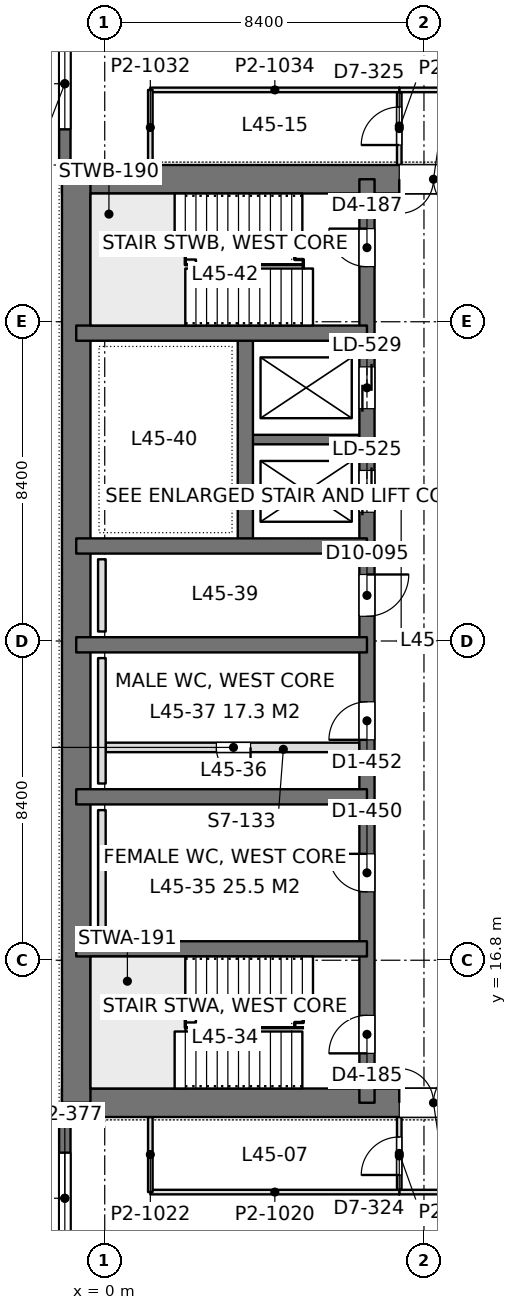
"""IFC4 building model, lengths in metres.
Left out: names, types, materials, properties, quantities, classifications, styles, units other than length and angle.
Written with IfcOpenShell. Run it as: python <this file> out.ifc"""

import sys

from ifc_helpers import new_model, si_unit, direction, frame, frame_2d, origin, place, context, subcontext, project, spatial, rectangle, extrude, element, fill, save


model = new_model("IFC4")
c1 = context("Model", 3, precision=1e-05, world=origin(), true_north=direction((0.0, 1.0)))
c2 = subcontext(c1, "Body", "Model", "MODEL_VIEW")
j1 = project(units=[si_unit("LENGTHUNIT", "METRE"), si_unit("PLANEANGLEUNIT", "RADIAN")], contexts=[c1])
p1 = place(None, origin())
s1 = spatial("IfcSite", under=j1, at=p1, CompositionType="ELEMENT")
p2 = place(p1, origin())
s2 = spatial("IfcBuilding", under=s1, at=p2, CompositionType="ELEMENT")
p3 = place(p2, frame((0.0, 0.0, 198.6)))
s3 = spatial("IfcBuildingStorey", under=s2, at=p3, CompositionType="ELEMENT", Elevation=198.6)
p4 = place(p3, frame((-1.125, 13.05, 0.0), z_axis=(0.0, 0.0, 1.0), x_axis=(1.0, 0.0, 0.0)))
e1 = element("IfcWall", 1, at=p4, inside=s3, PredefinedType="SHEAR", context=c2, shape_type="SweptSolid", body=[
    extrude(rectangle(XDim=17.85, YDim=0.75, at=frame_2d((8.925, 0.0))), origin(), (0.0, 0.0, 1.0), 4.2),
])
p5 = place(p4, frame((8.875, 0.0, 0.0)))
e2 = element("IfcOpeningElement", 2, at=p5, cuts=e1, PredefinedType="OPENING", context=c2, shape_type="SweptSolid", body=[
    extrude(rectangle(XDim=1.8, YDim=2.4, at=frame_2d((0.9, 1.2))), frame((0.0, 0.385, 0.0), z_axis=(0.0, -1.0, 0.0), x_axis=(1.0, 0.0, 0.0)), (0.0, 0.0, 1.0), 0.77),
])
p6 = place(p3, frame((-1.125, 37.35, 0.0), z_axis=(0.0, 0.0, 1.0), x_axis=(1.0, 0.0, 0.0)))
e3 = element("IfcWall", 3, at=p6, inside=s3, PredefinedType="SHEAR", context=c2, shape_type="SweptSolid", body=[
    extrude(rectangle(XDim=17.85, YDim=0.75, at=frame_2d((8.925, 0.0))), origin(), (0.0, 0.0, 1.0), 4.2),
])
p7 = place(p6, frame((8.875, 0.0, 0.0)))
e4 = element("IfcOpeningElement", 4, at=p7, cuts=e3, PredefinedType="OPENING", context=c2, shape_type="SweptSolid", body=[
    extrude(rectangle(XDim=1.8, YDim=2.4, at=frame_2d((0.9, 1.2))), frame((0.0, 0.385, 0.0), z_axis=(0.0, -1.0, 0.0), x_axis=(1.0, 0.0, 0.0)), (0.0, 0.0, 1.0), 0.77),
])
p8 = place(p3, frame((-0.75, 13.05, 0.0), z_axis=(0.0, 0.0, 1.0), x_axis=(0.0, 1.0, 0.0)))
e5 = element("IfcWall", 5, at=p8, inside=s3, PredefinedType="SHEAR", context=c2, shape_type="SweptSolid", body=[
    extrude(rectangle(XDim=24.3, YDim=0.75, at=frame_2d((12.15, 0.0))), origin(), (0.0, 0.0, 1.0), 4.2),
])
p9 = place(p3, frame((6.9, 13.05, 0.0), z_axis=(0.0, 0.0, 1.0), x_axis=(0.0, 1.0, 0.0)))
e6 = element("IfcWall", 6, at=p9, inside=s3, PredefinedType="SHEAR", context=c2, shape_type="SweptSolid", body=[
    extrude(rectangle(XDim=24.3, YDim=0.4, at=frame_2d((12.15, 0.0))), origin(), (0.0, 0.0, 1.0), 4.2),
])
p10 = place(p9, frame((1.3, 0.0, 0.0)))
e7 = element("IfcOpeningElement", 7, at=p10, cuts=e6, PredefinedType="OPENING", context=c2, shape_type="SweptSolid", body=[
    extrude(rectangle(XDim=1.0, YDim=2.2, at=frame_2d((0.5, 1.1))), frame((0.0, 0.21, 0.0), z_axis=(0.0, -1.0, 0.0), x_axis=(1.0, 0.0, 0.0)), (0.0, 0.0, 1.0), 0.42),
])
p11 = place(p9, frame((22.0, 0.0, 0.0)))
e8 = element("IfcOpeningElement", 8, at=p11, cuts=e6, PredefinedType="OPENING", context=c2, shape_type="SweptSolid", body=[
    extrude(rectangle(XDim=1.0, YDim=2.2, at=frame_2d((0.5, 1.1))), frame((0.0, 0.21, 0.0), z_axis=(0.0, -1.0, 0.0), x_axis=(1.0, 0.0, 0.0)), (0.0, 0.0, 1.0), 0.42),
])
p12 = place(p9, frame((5.55, 0.0, 0.0)))
e9 = element("IfcOpeningElement", 9, at=p12, cuts=e6, PredefinedType="OPENING", context=c2, shape_type="SweptSolid", body=[
    extrude(rectangle(XDim=1.0, YDim=2.2, at=frame_2d((0.5, 1.1))), frame((0.0, 0.21, 0.0), z_axis=(0.0, -1.0, 0.0), x_axis=(1.0, 0.0, 0.0)), (0.0, 0.0, 1.0), 0.42),
])
p13 = place(p9, frame((9.55, 0.0, 0.0)))
e10 = element("IfcOpeningElement", 10, at=p13, cuts=e6, PredefinedType="OPENING", context=c2, shape_type="SweptSolid", body=[
    extrude(rectangle(XDim=1.0, YDim=2.2, at=frame_2d((0.5, 1.1))), frame((0.0, 0.21, 0.0), z_axis=(0.0, -1.0, 0.0), x_axis=(1.0, 0.0, 0.0)), (0.0, 0.0, 1.0), 0.42),
])
p14 = place(p9, frame((12.8, 0.0, 0.0)))
e11 = element("IfcOpeningElement", 11, at=p14, cuts=e6, PredefinedType="OPENING", context=c2, shape_type="SweptSolid", body=[
    extrude(rectangle(XDim=1.1, YDim=2.2, at=frame_2d((0.55, 1.1))), frame((0.0, 0.21, 0.0), z_axis=(0.0, -1.0, 0.0), x_axis=(1.0, 0.0, 0.0)), (0.0, 0.0, 1.0), 0.42),
])
p15 = place(p9, frame((15.538, 0.0, 0.0)))
e12 = element("IfcOpeningElement", 12, at=p15, cuts=e6, PredefinedType="OPENING", context=c2, shape_type="SweptSolid", body=[
    extrude(rectangle(XDim=1.1, YDim=2.2, at=frame_2d((0.55, 1.1))), frame((0.0, 0.21, 0.0), z_axis=(0.0, -1.0, 0.0), x_axis=(1.0, 0.0, 0.0)), (0.0, 0.0, 1.0), 0.42),
])
p16 = place(p9, frame((18.262, 0.0, 0.0)))
e13 = element("IfcOpeningElement", 13, at=p16, cuts=e6, PredefinedType="OPENING", context=c2, shape_type="SweptSolid", body=[
    extrude(rectangle(XDim=1.1, YDim=2.2, at=frame_2d((0.55, 1.1))), frame((0.0, 0.21, 0.0), z_axis=(0.0, -1.0, 0.0), x_axis=(1.0, 0.0, 0.0)), (0.0, 0.0, 1.0), 0.42),
])
for number, where, z_axis, x_axis in (
    (14, (-0.75, 17.1, 0.0), (0.0, 0.0, 1.0), (1.0, 0.0, 0.0)),
    (15, (-0.75, 21.1, 0.0), (0.0, 0.0, 1.0), (1.0, 0.0, 0.0)),
    (16, (-0.75, 25.1, 0.0), (0.0, 0.0, 1.0), (1.0, 0.0, 0.0)),
    (17, (-0.75, 27.7, 0.0), (0.0, 0.0, 1.0), (1.0, 0.0, 0.0)),
    (18, (-0.75, 33.3, 0.0), (0.0, 0.0, 1.0), (1.0, 0.0, 0.0)),
):
    element("IfcWall", number, at=place(p3, frame(where, z_axis=z_axis, x_axis=x_axis)), inside=s3, PredefinedType="SHEAR", context=c2, shape_type="SweptSolid", body=[
        extrude(rectangle(XDim=7.65, YDim=0.4, at=frame_2d((3.825, 0.0))), origin(), (0.0, 0.0, 1.0), 4.2),
    ])
p17 = place(p3, frame((3.7, 27.7, 0.0), z_axis=(0.0, 0.0, 1.0), x_axis=(0.0, 1.0, 0.0)))
e19 = element("IfcWall", 19, at=p17, inside=s3, PredefinedType="SHEAR", context=c2, shape_type="SweptSolid", body=[
    extrude(rectangle(XDim=5.6, YDim=0.4, at=frame_2d((2.8, 0.0))), origin(), (0.0, 0.0, 1.0), 4.2),
])
p18 = place(p3, frame((3.7, 30.5, 0.0), z_axis=(0.0, 0.0, 1.0), x_axis=(1.0, 0.0, 0.0)))
e20 = element("IfcWall", 20, at=p18, inside=s3, PredefinedType="SHEAR", context=c2, shape_type="SweptSolid", body=[
    extrude(rectangle(XDim=3.2, YDim=0.25, at=frame_2d((1.6, 0.0))), origin(), (0.0, 0.0, 1.0), 4.2),
])
p19 = place(p3, frame((-1.05, 8.4, 0.0), z_axis=(0.0, 0.0, 1.0), x_axis=(0.0, 1.0, 0.0)))
e21 = element("IfcWall", 21, at=p19, inside=s3, PredefinedType="SOLIDWALL", context=c2, shape_type="SweptSolid", body=[
    extrude(rectangle(XDim=4.275, YDim=0.3, at=frame_2d((2.138, 0.0))), origin(), (0.0, 0.0, 1.0), 4.05),
])
p20 = place(p19, frame((0.938, 0.0, 0.9)))
e22 = element("IfcOpeningElement", 22, at=p20, cuts=e21, PredefinedType="OPENING", context=c2, shape_type="SweptSolid", body=[
    extrude(rectangle(XDim=2.4, YDim=1.9, at=frame_2d((1.2, 0.95))), frame((0.0, 0.16, 0.0), z_axis=(0.0, -1.0, 0.0), x_axis=(1.0, 0.0, 0.0)), (0.0, 0.0, 1.0), 0.32),
])
p21 = place(p3, frame((-1.05, 37.725, 0.0), z_axis=(0.0, 0.0, 1.0), x_axis=(0.0, 1.0, 0.0)))
e23 = element("IfcWall", 23, at=p21, inside=s3, PredefinedType="SOLIDWALL", context=c2, shape_type="SweptSolid", body=[
    extrude(rectangle(XDim=4.275, YDim=0.3, at=frame_2d((2.137, 0.0))), origin(), (0.0, 0.0, 1.0), 4.05),
])
p22 = place(p21, frame((0.938, 0.0, 0.9)))
e24 = element("IfcOpeningElement", 24, at=p22, cuts=e23, PredefinedType="OPENING", context=c2, shape_type="SweptSolid", body=[
    extrude(rectangle(XDim=2.4, YDim=1.9, at=frame_2d((1.2, 0.95))), frame((0.0, 0.16, 0.0), z_axis=(0.0, -1.0, 0.0), x_axis=(1.0, 0.0, 0.0)), (0.0, 0.0, 1.0), 0.32),
])
p23 = place(p3, frame((7.748, 10.7, 0.0), z_axis=(0.0, 0.0, 1.0), x_axis=(1.0, 0.0, 0.0)))
e25 = element("IfcWall", 25, at=p23, inside=s3, PredefinedType="PARTITIONING", context=c2, shape_type="SweptSolid", body=[
    extrude(rectangle(XDim=41.452, YDim=0.12, at=frame_2d((20.726, 0.0))), origin(), (0.0, 0.0, 1.0), 3.55),
])
p24 = place(p23, frame((4.919, 0.0, 0.0)))
e26 = element("IfcOpeningElement", 26, at=p24, cuts=e25, PredefinedType="OPENING", context=c2, shape_type="SweptSolid", body=[
    extrude(rectangle(XDim=1.8, YDim=2.2, at=frame_2d((0.9, 1.1))), frame((0.0, 0.07, 0.0), z_axis=(0.0, -1.0, 0.0), x_axis=(1.0, 0.0, 0.0)), (0.0, 0.0, 1.0), 0.14),
])
p25 = place(p23, frame((10.735, 0.0, 0.0)))
e27 = element("IfcOpeningElement", 27, at=p25, cuts=e25, PredefinedType="OPENING", context=c2, shape_type="SweptSolid", body=[
    extrude(rectangle(XDim=1.8, YDim=2.2, at=frame_2d((0.9, 1.1))), frame((0.0, 0.07, 0.0), z_axis=(0.0, -1.0, 0.0), x_axis=(1.0, 0.0, 0.0)), (0.0, 0.0, 1.0), 0.14),
])
p26 = place(p23, frame((24.552, 0.0, 0.0)))
e28 = element("IfcOpeningElement", 28, at=p26, cuts=e25, PredefinedType="OPENING", context=c2, shape_type="SweptSolid", body=[
    extrude(rectangle(XDim=1.8, YDim=2.2, at=frame_2d((0.9, 1.1))), frame((0.0, 0.07, 0.0), z_axis=(0.0, -1.0, 0.0), x_axis=(1.0, 0.0, 0.0)), (0.0, 0.0, 1.0), 0.14),
])
p27 = place(p23, frame((32.552, 0.0, 0.0)))
e29 = element("IfcOpeningElement", 29, at=p27, cuts=e25, PredefinedType="OPENING", context=c2, shape_type="SweptSolid", body=[
    extrude(rectangle(XDim=1.8, YDim=2.2, at=frame_2d((0.9, 1.1))), frame((0.0, 0.07, 0.0), z_axis=(0.0, -1.0, 0.0), x_axis=(1.0, 0.0, 0.0)), (0.0, 0.0, 1.0), 0.14),
])
p28 = place(p3, frame((7.75, 10.758, 0.0), z_axis=(0.0, 0.0, 1.0), x_axis=(0.0, 1.0, 0.0)))
e30 = element("IfcWall", 30, at=p28, inside=s3, PredefinedType="PARTITIONING", context=c2, shape_type="SweptSolid", body=[
    extrude(rectangle(XDim=1.918, YDim=0.12, at=frame_2d((0.959, 0.0))), origin(), (0.0, 0.0, 1.0), 4.05),
])
p29 = place(p28, frame((0.392, 0.0, 0.0)))
e31 = element("IfcOpeningElement", 31, at=p29, cuts=e30, PredefinedType="OPENING", context=c2, shape_type="SweptSolid", body=[
    extrude(rectangle(XDim=1.0, YDim=2.4, at=frame_2d((0.5, 1.2))), frame((0.0, 0.07, 0.0), z_axis=(0.0, -1.0, 0.0), x_axis=(1.0, 0.0, 0.0)), (0.0, 0.0, 1.0), 0.14),
])
p30 = place(p3, frame((1.2, 10.7, 0.0), z_axis=(0.0, 0.0, 1.0), x_axis=(1.0, 0.0, 0.0)))
e32 = element("IfcWall", 32, at=p30, inside=s3, PredefinedType="PARTITIONING", context=c2, shape_type="SweptSolid", body=[
    extrude(rectangle(XDim=6.552, YDim=0.12, at=frame_2d((3.276, 0.0))), origin(), (0.0, 0.0, 1.0), 4.05),
])
p31 = place(p3, frame((1.2, 10.7, 0.0), z_axis=(0.0, 0.0, 1.0), x_axis=(0.0, 1.0, 0.0)))
e33 = element("IfcWall", 33, at=p31, inside=s3, PredefinedType="PARTITIONING", context=c2, shape_type="SweptSolid", body=[
    extrude(rectangle(XDim=1.976, YDim=0.12, at=frame_2d((0.988, 0.0))), origin(), (0.0, 0.0, 1.0), 4.05),
])
p32 = place(p3, frame((7.748, 39.7, 0.0), z_axis=(0.0, 0.0, 1.0), x_axis=(1.0, 0.0, 0.0)))
e34 = element("IfcWall", 34, at=p32, inside=s3, PredefinedType="PARTITIONING", context=c2, shape_type="SweptSolid", body=[
    extrude(rectangle(XDim=41.452, YDim=0.12, at=frame_2d((20.726, 0.0))), origin(), (0.0, 0.0, 1.0), 3.55),
])
p33 = place(p32, frame((4.919, 0.0, 0.0)))
e35 = element("IfcOpeningElement", 35, at=p33, cuts=e34, PredefinedType="OPENING", context=c2, shape_type="SweptSolid", body=[
    extrude(rectangle(XDim=1.8, YDim=2.2, at=frame_2d((0.9, 1.1))), frame((0.0, 0.07, 0.0), z_axis=(0.0, -1.0, 0.0), x_axis=(1.0, 0.0, 0.0)), (0.0, 0.0, 1.0), 0.14),
])
p34 = place(p32, frame((10.735, 0.0, 0.0)))
e36 = element("IfcOpeningElement", 36, at=p34, cuts=e34, PredefinedType="OPENING", context=c2, shape_type="SweptSolid", body=[
    extrude(rectangle(XDim=1.8, YDim=2.2, at=frame_2d((0.9, 1.1))), frame((0.0, 0.07, 0.0), z_axis=(0.0, -1.0, 0.0), x_axis=(1.0, 0.0, 0.0)), (0.0, 0.0, 1.0), 0.14),
])
p35 = place(p32, frame((24.552, 0.0, 0.0)))
e37 = element("IfcOpeningElement", 37, at=p35, cuts=e34, PredefinedType="OPENING", context=c2, shape_type="SweptSolid", body=[
    extrude(rectangle(XDim=1.8, YDim=2.2, at=frame_2d((0.9, 1.1))), frame((0.0, 0.07, 0.0), z_axis=(0.0, -1.0, 0.0), x_axis=(1.0, 0.0, 0.0)), (0.0, 0.0, 1.0), 0.14),
])
p36 = place(p32, frame((32.552, 0.0, 0.0)))
e38 = element("IfcOpeningElement", 38, at=p36, cuts=e34, PredefinedType="OPENING", context=c2, shape_type="SweptSolid", body=[
    extrude(rectangle(XDim=1.8, YDim=2.2, at=frame_2d((0.9, 1.1))), frame((0.0, 0.07, 0.0), z_axis=(0.0, -1.0, 0.0), x_axis=(1.0, 0.0, 0.0)), (0.0, 0.0, 1.0), 0.14),
])
p37 = place(p3, frame((7.75, 37.724, 0.0), z_axis=(0.0, 0.0, 1.0), x_axis=(0.0, 1.0, 0.0)))
e39 = element("IfcWall", 39, at=p37, inside=s3, PredefinedType="PARTITIONING", context=c2, shape_type="SweptSolid", body=[
    extrude(rectangle(XDim=1.918, YDim=0.12, at=frame_2d((0.959, 0.0))), origin(), (0.0, 0.0, 1.0), 4.05),
])
p38 = place(p37, frame((0.526, 0.0, 0.0)))
e40 = element("IfcOpeningElement", 40, at=p38, cuts=e39, PredefinedType="OPENING", context=c2, shape_type="SweptSolid", body=[
    extrude(rectangle(XDim=1.0, YDim=2.4, at=frame_2d((0.5, 1.2))), frame((0.0, 0.07, 0.0), z_axis=(0.0, -1.0, 0.0), x_axis=(1.0, 0.0, 0.0)), (0.0, 0.0, 1.0), 0.14),
])
p39 = place(p3, frame((1.2, 39.7, 0.0), z_axis=(0.0, 0.0, 1.0), x_axis=(1.0, 0.0, 0.0)))
e41 = element("IfcWall", 41, at=p39, inside=s3, PredefinedType="PARTITIONING", context=c2, shape_type="SweptSolid", body=[
    extrude(rectangle(XDim=6.552, YDim=0.12, at=frame_2d((3.276, 0.0))), origin(), (0.0, 0.0, 1.0), 3.69),
])
p40 = place(p3, frame((1.2, 37.724, 0.0), z_axis=(0.0, 0.0, 1.0), x_axis=(0.0, 1.0, 0.0)))
e42 = element("IfcWall", 42, at=p40, inside=s3, PredefinedType="PARTITIONING", context=c2, shape_type="SweptSolid", body=[
    extrude(rectangle(XDim=1.976, YDim=0.12, at=frame_2d((0.988, 0.0))), origin(), (0.0, 0.0, 1.0), 4.05),
])
p41 = place(p3, frame((0.025, 22.4, 0.0), z_axis=(0.0, 0.0, 1.0), x_axis=(1.0, 0.0, 0.0)))
e43 = element("IfcWall", 43, at=p41, inside=s3, PredefinedType="PARTITIONING", context=c2, shape_type="SweptSolid", body=[
    extrude(rectangle(XDim=6.675, YDim=0.25, at=frame_2d((3.337, 0.0))), origin(), (0.0, 0.0, 1.0), 4.0),
])
p42 = place(p41, frame((2.913, 0.0, 0.0)))
e44 = element("IfcOpeningElement", 44, at=p42, cuts=e43, PredefinedType="OPENING", context=c2, shape_type="SweptSolid", body=[
    extrude(rectangle(XDim=0.9, YDim=2.2, at=frame_2d((0.45, 1.1))), frame((0.0, 0.135, 0.0), z_axis=(0.0, -1.0, 0.0), x_axis=(1.0, 0.0, 0.0)), (0.0, 0.0, 1.0), 0.27),
])
for number, where, z_axis, x_axis in (
    (45, (-0.075, 17.45, 0.0), (0.0, 0.0, 1.0), (0.0, 1.0, 0.0)),
    (46, (-0.075, 21.45, 0.0), (0.0, 0.0, 1.0), (0.0, 1.0, 0.0)),
):
    element("IfcWall", number, at=place(p3, frame(where, z_axis=z_axis, x_axis=x_axis)), inside=s3, PredefinedType="PLUMBINGWALL", context=c2, shape_type="SweptSolid", body=[
        extrude(rectangle(XDim=3.3, YDim=0.2, at=frame_2d((1.65, 0.0))), origin(), (0.0, 0.0, 1.0), 1.2),
    ])
p43 = place(p3, frame((-0.075, 25.45, 0.0), z_axis=(0.0, 0.0, 1.0), x_axis=(0.0, 1.0, 0.0)))
e47 = element("IfcWall", 47, at=p43, inside=s3, PredefinedType="PLUMBINGWALL", context=c2, shape_type="SweptSolid", body=[
    extrude(rectangle(XDim=1.9, YDim=0.2, at=frame_2d((0.95, 0.0))), origin(), (0.0, 0.0, 1.0), 1.2),
])
p44 = place(p20, origin())
e48 = element("IfcWindow", 48, at=p44, inside=s3, PartitioningType="SINGLE_PANEL", PredefinedType="WINDOW", context=c2, shape_type="SweptSolid", body=[
    extrude(rectangle(XDim=2.4, YDim=1.9, at=frame_2d((1.2, 0.95))), frame((0.0, 0.03, 0.0), z_axis=(0.0, -1.0, 0.0), x_axis=(1.0, 0.0, 0.0)), (0.0, 0.0, 1.0), 0.06),
])
fill(e22, e48)
p45 = place(p22, origin())
e49 = element("IfcWindow", 49, at=p45, inside=s3, PartitioningType="SINGLE_PANEL", PredefinedType="WINDOW", context=c2, shape_type="SweptSolid", body=[
    extrude(rectangle(XDim=2.4, YDim=1.9, at=frame_2d((1.2, 0.95))), frame((0.0, 0.03, 0.0), z_axis=(0.0, -1.0, 0.0), x_axis=(1.0, 0.0, 0.0)), (0.0, 0.0, 1.0), 0.06),
])
fill(e24, e49)
p46 = place(p5, origin())
e50 = element("IfcDoor", 50, at=p46, inside=s3, OperationType="DOUBLE_DOOR_SINGLE_SWING", PredefinedType="DOOR", context=c2, shape_type="SweptSolid", body=[
    extrude(rectangle(XDim=1.8, YDim=2.4, at=frame_2d((0.9, 1.2))), frame((0.0, 0.025, 0.0), z_axis=(0.0, -1.0, 0.0), x_axis=(1.0, 0.0, 0.0)), (0.0, 0.0, 1.0), 0.05),
])
fill(e2, e50)
p47 = place(p7, frame((1.8, 0.0, 0.0), z_axis=(0.0, 0.0, 1.0), x_axis=(-1.0, 0.0, 0.0)))
e51 = element("IfcDoor", 51, at=p47, inside=s3, OperationType="DOUBLE_DOOR_SINGLE_SWING", PredefinedType="DOOR", context=c2, shape_type="SweptSolid", body=[
    extrude(rectangle(XDim=1.8, YDim=2.4, at=frame_2d((0.9, 1.2))), frame((0.0, 0.025, 0.0), z_axis=(0.0, -1.0, 0.0), x_axis=(1.0, 0.0, 0.0)), (0.0, 0.0, 1.0), 0.05),
])
fill(e4, e51)
p48 = place(p10, origin())
e52 = element("IfcDoor", 52, at=p48, inside=s3, OperationType="SINGLE_SWING_LEFT", PredefinedType="DOOR", context=c2, shape_type="SweptSolid", body=[
    extrude(rectangle(XDim=1.0, YDim=2.2, at=frame_2d((0.5, 1.1))), frame((0.0, 0.025, 0.0), z_axis=(0.0, -1.0, 0.0), x_axis=(1.0, 0.0, 0.0)), (0.0, 0.0, 1.0), 0.05),
])
fill(e7, e52)
p49 = place(p11, origin())
e53 = element("IfcDoor", 53, at=p49, inside=s3, OperationType="SINGLE_SWING_RIGHT", PredefinedType="DOOR", context=c2, shape_type="SweptSolid", body=[
    extrude(rectangle(XDim=1.0, YDim=2.2, at=frame_2d((0.5, 1.1))), frame((0.0, 0.025, 0.0), z_axis=(0.0, -1.0, 0.0), x_axis=(1.0, 0.0, 0.0)), (0.0, 0.0, 1.0), 0.05),
])
fill(e8, e53)
p50 = place(p12, origin())
e54 = element("IfcDoor", 54, at=p50, inside=s3, OperationType="SINGLE_SWING_RIGHT", PredefinedType="DOOR", context=c2, shape_type="SweptSolid", body=[
    extrude(rectangle(XDim=1.0, YDim=2.2, at=frame_2d((0.5, 1.1))), frame((0.0, 0.025, 0.0), z_axis=(0.0, -1.0, 0.0), x_axis=(1.0, 0.0, 0.0)), (0.0, 0.0, 1.0), 0.05),
])
fill(e9, e54)
p51 = place(p13, origin())
e55 = element("IfcDoor", 55, at=p51, inside=s3, OperationType="SINGLE_SWING_LEFT", PredefinedType="DOOR", context=c2, shape_type="SweptSolid", body=[
    extrude(rectangle(XDim=1.0, YDim=2.2, at=frame_2d((0.5, 1.1))), frame((0.0, 0.025, 0.0), z_axis=(0.0, -1.0, 0.0), x_axis=(1.0, 0.0, 0.0)), (0.0, 0.0, 1.0), 0.05),
])
fill(e10, e55)
p52 = place(p14, frame((1.1, 0.0, 0.0), z_axis=(0.0, 0.0, 1.0), x_axis=(-1.0, 0.0, 0.0)))
e56 = element("IfcDoor", 56, at=p52, inside=s3, OperationType="SINGLE_SWING_LEFT", PredefinedType="DOOR", context=c2, shape_type="SweptSolid", body=[
    extrude(rectangle(XDim=1.1, YDim=2.2, at=frame_2d((0.55, 1.1))), frame((0.0, 0.025, 0.0), z_axis=(0.0, -1.0, 0.0), x_axis=(1.0, 0.0, 0.0)), (0.0, 0.0, 1.0), 0.05),
])
fill(e11, e56)
p53 = place(p15, origin())
e57 = element("IfcDoor", 57, at=p53, inside=s3, OperationType="DOUBLE_DOOR_SLIDING", PredefinedType="DOOR", context=c2, shape_type="SweptSolid", body=[
    extrude(rectangle(XDim=1.1, YDim=2.2, at=frame_2d((0.55, 1.1))), frame((0.0, 0.025, 0.0), z_axis=(0.0, -1.0, 0.0), x_axis=(1.0, 0.0, 0.0)), (0.0, 0.0, 1.0), 0.05),
])
fill(e12, e57)
p54 = place(p16, origin())
e58 = element("IfcDoor", 58, at=p54, inside=s3, OperationType="DOUBLE_DOOR_SLIDING", PredefinedType="DOOR", context=c2, shape_type="SweptSolid", body=[
    extrude(rectangle(XDim=1.1, YDim=2.2, at=frame_2d((0.55, 1.1))), frame((0.0, 0.025, 0.0), z_axis=(0.0, -1.0, 0.0), x_axis=(1.0, 0.0, 0.0)), (0.0, 0.0, 1.0), 0.05),
])
fill(e13, e58)
p55 = place(p29, origin())
e59 = element("IfcDoor", 59, at=p55, inside=s3, OperationType="SINGLE_SWING_LEFT", PredefinedType="DOOR", context=c2, shape_type="SweptSolid", body=[
    extrude(rectangle(XDim=1.0, YDim=2.4, at=frame_2d((0.5, 1.2))), frame((0.0, 0.025, 0.0), z_axis=(0.0, -1.0, 0.0), x_axis=(1.0, 0.0, 0.0)), (0.0, 0.0, 1.0), 0.05),
])
fill(e31, e59)
p56 = place(p38, origin())
e60 = element("IfcDoor", 60, at=p56, inside=s3, OperationType="SINGLE_SWING_LEFT", PredefinedType="DOOR", context=c2, shape_type="SweptSolid", body=[
    extrude(rectangle(XDim=1.0, YDim=2.4, at=frame_2d((0.5, 1.2))), frame((0.0, 0.025, 0.0), z_axis=(0.0, -1.0, 0.0), x_axis=(1.0, 0.0, 0.0)), (0.0, 0.0, 1.0), 0.05),
])
fill(e40, e60)
p57 = place(p42, frame((0.9, 0.0, 0.0), z_axis=(0.0, 0.0, 1.0), x_axis=(-1.0, 0.0, 0.0)))
e61 = element("IfcDoor", 61, at=p57, inside=s3, OperationType="SINGLE_SWING_LEFT", PredefinedType="DOOR", context=c2, shape_type="SweptSolid", body=[
    extrude(rectangle(XDim=0.9, YDim=2.2, at=frame_2d((0.45, 1.1))), frame((0.0, 0.025, 0.0), z_axis=(0.0, -1.0, 0.0), x_axis=(1.0, 0.0, 0.0)), (0.0, 0.0, 1.0), 0.05),
])
fill(e44, e61)
save(model, sys.argv[1])
